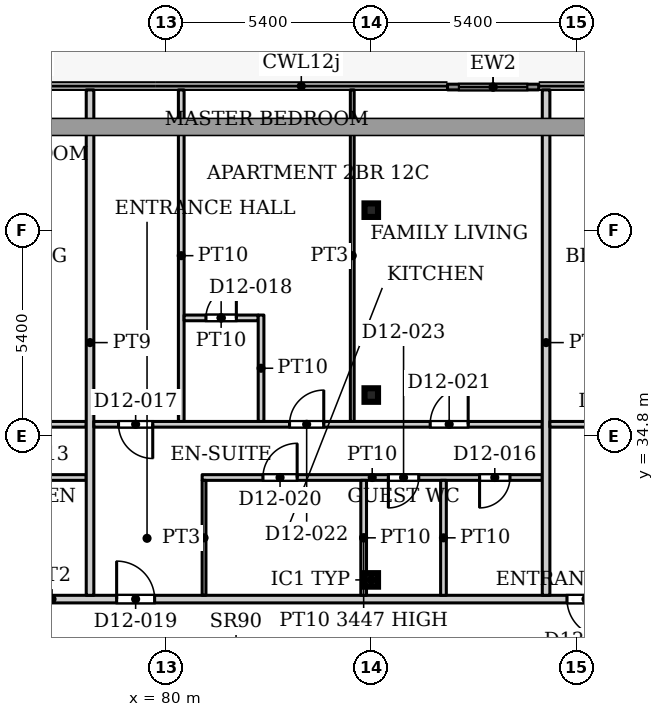
"""IFC4 building model, lengths in metres.
Left out: names, types, materials, properties, quantities, classifications, styles, units other than length and angle.
Written with IfcOpenShell. Run it as: python <this file> out.ifc"""

import sys

from ifc_helpers import new_model, si_unit, direction, frame, frame_2d, origin, origin_2d, place, context, subcontext, project, spatial, rectangle, hollow_rectangle, extrude, source, transform, mapped, element, fill, save


model = new_model("IFC4")
c1 = context("Model", 3, precision=1e-05, world=origin(), true_north=direction((0.0, 1.0)))
c2 = subcontext(c1, "Body", "Model", "MODEL_VIEW")
j1 = project(units=[si_unit("LENGTHUNIT", "METRE"), si_unit("PLANEANGLEUNIT", "RADIAN")], contexts=[c1])
p1 = place(None, origin())
s1 = spatial("IfcSite", under=j1, at=p1, CompositionType="ELEMENT")
p2 = place(p1, origin())
s2 = spatial("IfcBuilding", under=s1, at=p2, CompositionType="ELEMENT")
p3 = place(p2, frame((0.0, 0.0, 53.9)))
s3 = spatial("IfcBuildingStorey", under=s2, at=p3, CompositionType="ELEMENT", Elevation=53.9)
for number, where, z_axis, x_axis in (
    (1, (85.4, 31.005, 0.0), (0.0, 0.0, 1.0), (1.0, 0.0, 0.0)),
    (2, (85.4, 35.87, 0.0), (0.0, 0.0, 1.0), (1.0, 0.0, 0.0)),
    (3, (85.4, 40.735, 0.0), (0.0, 0.0, 1.0), (1.0, 0.0, 0.0)),
):
    element("IfcColumn", number, at=place(p3, frame(where, z_axis=z_axis, x_axis=x_axis)), inside=s3, PredefinedType="COLUMN", context=c2, shape_type="SweptSolid", body=[
        extrude(hollow_rectangle(XDim=0.356, YDim=0.356, WallThickness=0.016, InnerFilletRadius=0.016, OuterFilletRadius=0.032, at=origin_2d()), origin(), (0.0, 0.0, 1.0), 3.9),
    ])
p4 = place(p3, frame((87.406, 43.975, 0.0), z_axis=(0.0, 0.0, 1.0), x_axis=(1.0, 0.0, 0.0)))
e4 = element("IfcWall", 4, at=p4, inside=s3, PredefinedType="SOLIDWALL", context=c2, shape_type="SweptSolid", body=[
    extrude(rectangle(XDim=2.4, YDim=0.15, at=frame_2d((1.2, 0.0))), origin(), (0.0, 0.0, 1.0), 3.75),
])
p5 = place(p4, frame((0.3, 0.0, 0.0)))
e5 = element("IfcOpeningElement", 5, at=p5, cuts=e4, PredefinedType="OPENING", context=c2, shape_type="SweptSolid", body=[
    extrude(rectangle(XDim=1.8, YDim=2.4, at=frame_2d((0.9, 1.2))), frame((0.0, 0.085, 0.0), z_axis=(0.0, -1.0, 0.0), x_axis=(1.0, 0.0, 0.0)), (0.0, 0.0, 1.0), 0.17),
])
p6 = place(p3, frame((55.9, 30.5, 0.0), z_axis=(0.0, 0.0, 1.0), x_axis=(1.0, 0.0, 0.0)))
e6 = element("IfcWall", 6, at=p6, inside=s3, PredefinedType="PARTITIONING", context=c2, shape_type="SweptSolid", body=[
    extrude(rectangle(XDim=42.2, YDim=0.2, at=frame_2d((21.1, 0.0))), origin(), (0.0, 0.0, 1.0), 3.6),
])
p7 = place(p6, frame((0.6, 0.0, 0.0)))
e7 = element("IfcOpeningElement", 7, at=p7, cuts=e6, PredefinedType="OPENING", context=c2, shape_type="SweptSolid", body=[
    extrude(rectangle(XDim=1.0, YDim=2.1, at=frame_2d((0.5, 1.05))), frame((0.0, 0.11, 0.0), z_axis=(0.0, -1.0, 0.0), x_axis=(1.0, 0.0, 0.0)), (0.0, 0.0, 1.0), 0.22),
])
p8 = place(p6, frame((13.2, 0.0, 0.0)))
e8 = element("IfcOpeningElement", 8, at=p8, cuts=e6, PredefinedType="OPENING", context=c2, shape_type="SweptSolid", body=[
    extrude(rectangle(XDim=1.0, YDim=2.1, at=frame_2d((0.5, 1.05))), frame((0.0, 0.11, 0.0), z_axis=(0.0, -1.0, 0.0), x_axis=(1.0, 0.0, 0.0)), (0.0, 0.0, 1.0), 0.22),
])
p9 = place(p6, frame((22.8, 0.0, 0.0)))
e9 = element("IfcOpeningElement", 9, at=p9, cuts=e6, PredefinedType="OPENING", context=c2, shape_type="SweptSolid", body=[
    extrude(rectangle(XDim=1.0, YDim=2.1, at=frame_2d((0.5, 1.05))), frame((0.0, 0.11, 0.0), z_axis=(0.0, -1.0, 0.0), x_axis=(1.0, 0.0, 0.0)), (0.0, 0.0, 1.0), 0.22),
])
p10 = place(p6, frame((34.65, 0.0, 0.0)))
e10 = element("IfcOpeningElement", 10, at=p10, cuts=e6, PredefinedType="OPENING", context=c2, shape_type="SweptSolid", body=[
    extrude(rectangle(XDim=1.0, YDim=2.1, at=frame_2d((0.5, 1.05))), frame((0.0, 0.11, 0.0), z_axis=(0.0, -1.0, 0.0), x_axis=(1.0, 0.0, 0.0)), (0.0, 0.0, 1.0), 0.22),
])
p11 = place(p3, frame((68.8, 35.1, 0.0), z_axis=(0.0, 0.0, 1.0), x_axis=(1.0, 0.0, 0.0)))
e11 = element("IfcWall", 11, at=p11, inside=s3, PredefinedType="PARTITIONING", context=c2, shape_type="SweptSolid", body=[
    extrude(rectangle(XDim=9.1, YDim=0.15, at=frame_2d((4.55, 0.0))), origin(), (0.0, 0.0, 1.0), 3.6),
])
p12 = place(p11, frame((1.4, 0.0, 0.0)))
e12 = element("IfcOpeningElement", 12, at=p12, cuts=e11, PredefinedType="OPENING", context=c2, shape_type="SweptSolid", body=[
    extrude(rectangle(XDim=0.9, YDim=2.1, at=frame_2d((0.45, 1.05))), frame((0.0, 0.085, 0.0), z_axis=(0.0, -1.0, 0.0), x_axis=(1.0, 0.0, 0.0)), (0.0, 0.0, 1.0), 0.17),
])
p13 = place(p11, frame((6.0, 0.0, 0.0)))
e13 = element("IfcOpeningElement", 13, at=p13, cuts=e11, PredefinedType="OPENING", context=c2, shape_type="SweptSolid", body=[
    extrude(rectangle(XDim=1.0, YDim=2.1, at=frame_2d((0.5, 1.05))), frame((0.0, 0.085, 0.0), z_axis=(0.0, -1.0, 0.0), x_axis=(1.0, 0.0, 0.0)), (0.0, 0.0, 1.0), 0.17),
])
p14 = place(p3, frame((70.425, 33.7, 0.0), z_axis=(0.0, 0.0, 1.0), x_axis=(1.0, 0.0, 0.0)))
e14 = element("IfcWall", 14, at=p14, inside=s3, PredefinedType="PARTITIONING", context=c2, shape_type="SweptSolid", body=[
    extrude(rectangle(XDim=7.475, YDim=0.15, at=frame_2d((3.737, 0.0))), origin(), (0.0, 0.0, 1.0), 3.6),
])
p15 = place(p14, frame((0.875, 0.0, 0.0)))
e15 = element("IfcOpeningElement", 15, at=p15, cuts=e14, PredefinedType="OPENING", context=c2, shape_type="SweptSolid", body=[
    extrude(rectangle(XDim=0.8, YDim=2.1, at=frame_2d((0.4, 1.05))), frame((0.0, 0.085, 0.0), z_axis=(0.0, -1.0, 0.0), x_axis=(1.0, 0.0, 0.0)), (0.0, 0.0, 1.0), 0.17),
])
p16 = place(p14, frame((5.475, 0.0, 0.0)))
e16 = element("IfcOpeningElement", 16, at=p16, cuts=e14, PredefinedType="OPENING", context=c2, shape_type="SweptSolid", body=[
    extrude(rectangle(XDim=0.9, YDim=2.1, at=frame_2d((0.45, 1.05))), frame((0.0, 0.085, 0.0), z_axis=(0.0, -1.0, 0.0), x_axis=(1.0, 0.0, 0.0)), (0.0, 0.0, 1.0), 0.17),
])
p17 = place(p14, frame((2.975, 0.0, 0.0)))
e17 = element("IfcOpeningElement", 17, at=p17, cuts=e14, PredefinedType="OPENING", context=c2, shape_type="SweptSolid", body=[
    extrude(rectangle(XDim=0.8, YDim=2.1, at=frame_2d((0.4, 1.05))), frame((0.0, 0.085, 0.0), z_axis=(0.0, -1.0, 0.0), x_axis=(1.0, 0.0, 0.0)), (0.0, 0.0, 1.0), 0.17),
])
p18 = place(p3, frame((78.0, 30.6, 0.0), z_axis=(0.0, 0.0, 1.0), x_axis=(0.0, 1.0, 0.0)))
e18 = element("IfcWall", 18, at=p18, inside=s3, PredefinedType="PARTITIONING", context=c2, shape_type="SweptSolid", body=[
    extrude(rectangle(XDim=13.3, YDim=0.2, at=frame_2d((6.65, 0.0))), origin(), (0.0, 0.0, 1.0), 3.6),
])
p19 = place(p3, frame((78.1, 35.1, 0.0), z_axis=(0.0, 0.0, 1.0), x_axis=(1.0, 0.0, 0.0)))
e19 = element("IfcWall", 19, at=p19, inside=s3, PredefinedType="PARTITIONING", context=c2, shape_type="SweptSolid", body=[
    extrude(rectangle(XDim=11.8, YDim=0.15, at=frame_2d((5.9, 0.0))), origin(), (0.0, 0.0, 1.0), 3.6),
])
p20 = place(p19, frame((0.65, 0.0, 0.0)))
e20 = element("IfcOpeningElement", 20, at=p20, cuts=e19, PredefinedType="OPENING", context=c2, shape_type="SweptSolid", body=[
    extrude(rectangle(XDim=0.9, YDim=2.1, at=frame_2d((0.45, 1.05))), frame((0.0, 0.085, 0.0), z_axis=(0.0, -1.0, 0.0), x_axis=(1.0, 0.0, 0.0)), (0.0, 0.0, 1.0), 0.17),
])
p21 = place(p19, frame((8.85, 0.0, 0.0)))
e21 = element("IfcOpeningElement", 21, at=p21, cuts=e19, PredefinedType="OPENING", context=c2, shape_type="SweptSolid", body=[
    extrude(rectangle(XDim=1.0, YDim=2.1, at=frame_2d((0.5, 1.05))), frame((0.0, 0.085, 0.0), z_axis=(0.0, -1.0, 0.0), x_axis=(1.0, 0.0, 0.0)), (0.0, 0.0, 1.0), 0.17),
])
p22 = place(p19, frame((5.15, 0.0, 0.0)))
e22 = element("IfcOpeningElement", 22, at=p22, cuts=e19, PredefinedType="OPENING", context=c2, shape_type="SweptSolid", body=[
    extrude(rectangle(XDim=0.9, YDim=2.1, at=frame_2d((0.45, 1.05))), frame((0.0, 0.085, 0.0), z_axis=(0.0, -1.0, 0.0), x_axis=(1.0, 0.0, 0.0)), (0.0, 0.0, 1.0), 0.17),
])
p23 = place(p3, frame((80.4, 35.175, 0.0), z_axis=(0.0, 0.0, 1.0), x_axis=(0.0, 1.0, 0.0)))
e23 = element("IfcWall", 23, at=p23, inside=s3, PredefinedType="PARTITIONING", context=c2, shape_type="SweptSolid", body=[
    extrude(rectangle(XDim=8.725, YDim=0.15, at=frame_2d((4.362, 0.0))), origin(), (0.0, 0.0, 1.0), 3.6),
])
p24 = place(p3, frame((80.475, 37.9, 0.0), z_axis=(0.0, 0.0, 1.0), x_axis=(1.0, 0.0, 0.0)))
e24 = element("IfcWall", 24, at=p24, inside=s3, PredefinedType="PARTITIONING", context=c2, shape_type="SweptSolid", body=[
    extrude(rectangle(XDim=1.95, YDim=0.15, at=frame_2d((0.975, 0.0))), origin(), (0.0, 0.0, 1.0), 3.6),
])
p25 = place(p24, frame((0.575, 0.0, 0.0)))
e25 = element("IfcOpeningElement", 25, at=p25, cuts=e24, PredefinedType="OPENING", context=c2, shape_type="SweptSolid", body=[
    extrude(rectangle(XDim=0.8, YDim=2.1, at=frame_2d((0.4, 1.05))), frame((0.0, 0.085, 0.0), z_axis=(0.0, -1.0, 0.0), x_axis=(1.0, 0.0, 0.0)), (0.0, 0.0, 1.0), 0.17),
])
p26 = place(p3, frame((80.95, 33.7, 0.0), z_axis=(0.0, 0.0, 1.0), x_axis=(1.0, 0.0, 0.0)))
e26 = element("IfcWall", 26, at=p26, inside=s3, PredefinedType="PARTITIONING", context=c2, shape_type="SweptSolid", body=[
    extrude(rectangle(XDim=8.95, YDim=0.15, at=frame_2d((4.475, 0.0))), origin(), (0.0, 0.0, 1.0), 3.6),
])
p27 = place(p26, frame((7.3, 0.0, 0.0)))
e27 = element("IfcOpeningElement", 27, at=p27, cuts=e26, PredefinedType="OPENING", context=c2, shape_type="SweptSolid", body=[
    extrude(rectangle(XDim=0.8, YDim=2.1, at=frame_2d((0.4, 1.05))), frame((0.0, 0.085, 0.0), z_axis=(0.0, -1.0, 0.0), x_axis=(1.0, 0.0, 0.0)), (0.0, 0.0, 1.0), 0.17),
])
p28 = place(p26, frame((1.6, 0.0, 0.0)))
e28 = element("IfcOpeningElement", 28, at=p28, cuts=e26, PredefinedType="OPENING", context=c2, shape_type="SweptSolid", body=[
    extrude(rectangle(XDim=0.9, YDim=2.1, at=frame_2d((0.45, 1.05))), frame((0.0, 0.085, 0.0), z_axis=(0.0, -1.0, 0.0), x_axis=(1.0, 0.0, 0.0)), (0.0, 0.0, 1.0), 0.17),
])
p29 = place(p26, frame((4.9, 0.0, 0.0)))
e29 = element("IfcOpeningElement", 29, at=p29, cuts=e26, PredefinedType="OPENING", context=c2, shape_type="SweptSolid", body=[
    extrude(rectangle(XDim=0.8, YDim=2.1, at=frame_2d((0.4, 1.05))), frame((0.0, 0.085, 0.0), z_axis=(0.0, -1.0, 0.0), x_axis=(1.0, 0.0, 0.0)), (0.0, 0.0, 1.0), 0.17),
])
p30 = place(p3, frame((81.0, 30.6, 0.0), z_axis=(0.0, 0.0, 1.0), x_axis=(0.0, 1.0, 0.0)))
e30 = element("IfcWall", 30, at=p30, inside=s3, PredefinedType="PARTITIONING", context=c2, shape_type="SweptSolid", body=[
    extrude(rectangle(XDim=3.025, YDim=0.1, at=frame_2d((1.512, 0.0))), origin(), (0.0, 0.0, 1.0), 3.6),
])
p31 = place(p3, frame((82.5, 35.175, 0.0), z_axis=(0.0, 0.0, 1.0), x_axis=(0.0, 1.0, 0.0)))
e31 = element("IfcWall", 31, at=p31, inside=s3, PredefinedType="PARTITIONING", context=c2, shape_type="SweptSolid", body=[
    extrude(rectangle(XDim=2.8, YDim=0.15, at=frame_2d((1.4, 0.0))), origin(), (0.0, 0.0, 1.0), 3.6),
])
p32 = place(p3, frame((84.9, 35.175, 0.0), z_axis=(0.0, 0.0, 1.0), x_axis=(0.0, 1.0, 0.0)))
e32 = element("IfcWall", 32, at=p32, inside=s3, PredefinedType="PARTITIONING", context=c2, shape_type="SweptSolid", body=[
    extrude(rectangle(XDim=8.725, YDim=0.1, at=frame_2d((4.362, 0.0))), origin(), (0.0, 0.0, 1.0), 3.6),
])
p33 = place(p3, frame((85.2, 30.6, 0.0), z_axis=(0.0, 0.0, 1.0), x_axis=(0.0, 1.0, 0.0)))
e33 = element("IfcWall", 33, at=p33, inside=s3, PredefinedType="PARTITIONING", context=c2, shape_type="SweptSolid", body=[
    extrude(rectangle(XDim=3.025, YDim=0.15, at=frame_2d((1.512, 0.0))), origin(), (0.0, 0.0, 1.0), 3.447),
])
p34 = place(p3, frame((87.3, 30.6, 0.0), z_axis=(0.0, 0.0, 1.0), x_axis=(0.0, 1.0, 0.0)))
e34 = element("IfcWall", 34, at=p34, inside=s3, PredefinedType="PARTITIONING", context=c2, shape_type="SweptSolid", body=[
    extrude(rectangle(XDim=3.025, YDim=0.15, at=frame_2d((1.512, 0.0))), origin(), (0.0, 0.0, 1.0), 3.6),
])
p35 = place(p3, frame((90.0, 30.6, 0.0), z_axis=(0.0, 0.0, 1.0), x_axis=(0.0, 1.0, 0.0)))
e35 = element("IfcWall", 35, at=p35, inside=s3, PredefinedType="PARTITIONING", context=c2, shape_type="SweptSolid", body=[
    extrude(rectangle(XDim=13.3, YDim=0.2, at=frame_2d((6.65, 0.0))), origin(), (0.0, 0.0, 1.0), 3.6),
])
p36 = place(p3, frame((90.1, 35.1, 0.0), z_axis=(0.0, 0.0, 1.0), x_axis=(1.0, 0.0, 0.0)))
e36 = element("IfcWall", 36, at=p36, inside=s3, PredefinedType="PARTITIONING", context=c2, shape_type="SweptSolid", body=[
    extrude(rectangle(XDim=9.8, YDim=0.15, at=frame_2d((4.9, 0.0))), origin(), (0.0, 0.0, 1.0), 3.6),
])
p37 = place(p36, frame((1.4, 0.0, 0.0)))
e37 = element("IfcOpeningElement", 37, at=p37, cuts=e36, PredefinedType="OPENING", context=c2, shape_type="SweptSolid", body=[
    extrude(rectangle(XDim=0.9, YDim=2.1, at=frame_2d((0.45, 1.05))), frame((0.0, 0.085, 0.0), z_axis=(0.0, -1.0, 0.0), x_axis=(1.0, 0.0, 0.0)), (0.0, 0.0, 1.0), 0.17),
])
p38 = place(p36, frame((6.3, 0.0, 0.0)))
e38 = element("IfcOpeningElement", 38, at=p38, cuts=e36, PredefinedType="OPENING", context=c2, shape_type="SweptSolid", body=[
    extrude(rectangle(XDim=1.0, YDim=2.1, at=frame_2d((0.5, 1.05))), frame((0.0, 0.085, 0.0), z_axis=(0.0, -1.0, 0.0), x_axis=(1.0, 0.0, 0.0)), (0.0, 0.0, 1.0), 0.17),
])
m1 = source(origin(), c2, "Body", "SweptSolid", [
    extrude(rectangle(XDim=1.8, YDim=2.4, at=frame_2d((0.9, 1.2))), frame((0.0, 0.025, 0.0), z_axis=(0.0, -1.0, 0.0), x_axis=(1.0, 0.0, 0.0)), (0.0, 0.0, 1.0), 0.05),
])
p39 = place(p5, origin())
e39 = element("IfcDoor", 39, at=p39, inside=s3, OperationType="SLIDING_TO_LEFT", PredefinedType="DOOR", context=c2, shape_type="MappedRepresentation", body=[
    mapped(m1, transform((0.0, 0.0, 0.0), x_axis=(1.0, 0.0, 0.0), y_axis=(0.0, 1.0, 0.0), z_axis=(0.0, 0.0, 1.0), scale=1.0)),
])
fill(e5, e39)
m2 = source(origin(), c2, "Body", "SweptSolid", [
    extrude(rectangle(XDim=0.8, YDim=2.1, at=frame_2d((0.4, 1.05))), frame((0.0, 0.025, 0.0), z_axis=(0.0, -1.0, 0.0), x_axis=(1.0, 0.0, 0.0)), (0.0, 0.0, 1.0), 0.05),
])
p40 = place(p27, origin())
e40 = element("IfcDoor", 40, at=p40, inside=s3, OperationType="SINGLE_SWING_RIGHT", PredefinedType="DOOR", context=c2, shape_type="MappedRepresentation", body=[
    mapped(m2, transform((0.0, 0.0, 0.0), x_axis=(1.0, 0.0, 0.0), y_axis=(0.0, 1.0, 0.0), z_axis=(0.0, 0.0, 1.0), scale=1.0)),
])
fill(e27, e40)
m3 = source(origin(), c2, "Body", "SweptSolid", [
    extrude(rectangle(XDim=0.9, YDim=2.1, at=frame_2d((0.45, 1.05))), frame((0.0, 0.025, 0.0), z_axis=(0.0, -1.0, 0.0), x_axis=(1.0, 0.0, 0.0)), (0.0, 0.0, 1.0), 0.05),
])
p41 = place(p20, origin())
e41 = element("IfcDoor", 41, at=p41, inside=s3, OperationType="SINGLE_SWING_RIGHT", PredefinedType="DOOR", context=c2, shape_type="MappedRepresentation", body=[
    mapped(m3, transform((0.0, 0.0, 0.0), x_axis=(1.0, 0.0, 0.0), y_axis=(0.0, 1.0, 0.0), z_axis=(0.0, 0.0, 1.0), scale=1.0)),
])
fill(e20, e41)
p42 = place(p25, origin())
e42 = element("IfcDoor", 42, at=p42, inside=s3, OperationType="SINGLE_SWING_LEFT", PredefinedType="DOOR", context=c2, shape_type="MappedRepresentation", body=[
    mapped(m2, transform((0.0, 0.0, 0.0), x_axis=(1.0, 0.0, 0.0), y_axis=(0.0, 1.0, 0.0), z_axis=(0.0, 0.0, 1.0), scale=1.0)),
])
fill(e25, e42)
m4 = source(origin(), c2, "Body", "SweptSolid", [
    extrude(rectangle(XDim=1.0, YDim=2.1, at=frame_2d((0.5, 1.05))), frame((0.0, 0.025, 0.0), z_axis=(0.0, -1.0, 0.0), x_axis=(1.0, 0.0, 0.0)), (0.0, 0.0, 1.0), 0.05),
])
p43 = place(p9, origin())
e43 = element("IfcDoor", 43, at=p43, inside=s3, OperationType="SINGLE_SWING_LEFT", PredefinedType="DOOR", context=c2, shape_type="MappedRepresentation", body=[
    mapped(m4, transform((0.0, 0.0, 0.0), x_axis=(1.0, 0.0, 0.0), y_axis=(0.0, 1.0, 0.0), z_axis=(0.0, 0.0, 1.0), scale=1.0)),
])
fill(e9, e43)
p44 = place(p28, origin())
e44 = element("IfcDoor", 44, at=p44, inside=s3, OperationType="SINGLE_SWING_LEFT", PredefinedType="DOOR", context=c2, shape_type="MappedRepresentation", body=[
    mapped(m3, transform((0.0, 0.0, 0.0), x_axis=(1.0, 0.0, 0.0), y_axis=(0.0, 1.0, 0.0), z_axis=(0.0, 0.0, 1.0), scale=1.0)),
])
fill(e28, e44)
m5 = source(origin(), c2, "Body", "SweptSolid", [
    extrude(rectangle(XDim=1.0, YDim=2.1, at=frame_2d((0.5, 1.05))), frame((0.0, 0.025, 0.0), z_axis=(0.0, -1.0, 0.0), x_axis=(1.0, 0.0, 0.0)), (0.0, 0.0, 1.0), 0.05),
])
p45 = place(p21, origin())
e45 = element("IfcDoor", 45, at=p45, inside=s3, OperationType="SINGLE_SWING_LEFT", PredefinedType="DOOR", context=c2, shape_type="MappedRepresentation", body=[
    mapped(m5, transform((0.0, 0.0, 0.0), x_axis=(1.0, 0.0, 0.0), y_axis=(0.0, 1.0, 0.0), z_axis=(0.0, 0.0, 1.0), scale=1.0)),
])
fill(e21, e45)
p46 = place(p22, origin())
e46 = element("IfcDoor", 46, at=p46, inside=s3, OperationType="SINGLE_SWING_LEFT", PredefinedType="DOOR", context=c2, shape_type="MappedRepresentation", body=[
    mapped(m3, transform((0.0, 0.0, 0.0), x_axis=(1.0, 0.0, 0.0), y_axis=(0.0, 1.0, 0.0), z_axis=(0.0, 0.0, 1.0), scale=1.0)),
])
fill(e22, e46)
p47 = place(p29, origin())
e47 = element("IfcDoor", 47, at=p47, inside=s3, OperationType="SINGLE_SWING_RIGHT", PredefinedType="DOOR", context=c2, shape_type="MappedRepresentation", body=[
    mapped(m2, transform((0.0, 0.0, 0.0), x_axis=(1.0, 0.0, 0.0), y_axis=(0.0, 1.0, 0.0), z_axis=(0.0, 0.0, 1.0), scale=1.0)),
])
fill(e29, e47)
p48 = place(p10, origin())
e48 = element("IfcDoor", 48, at=p48, inside=s3, OperationType="SINGLE_SWING_RIGHT", PredefinedType="DOOR", context=c2, shape_type="MappedRepresentation", body=[
    mapped(m4, transform((0.0, 0.0, 0.0), x_axis=(1.0, 0.0, 0.0), y_axis=(0.0, 1.0, 0.0), z_axis=(0.0, 0.0, 1.0), scale=1.0)),
])
fill(e10, e48)
save(model, sys.argv[1])
